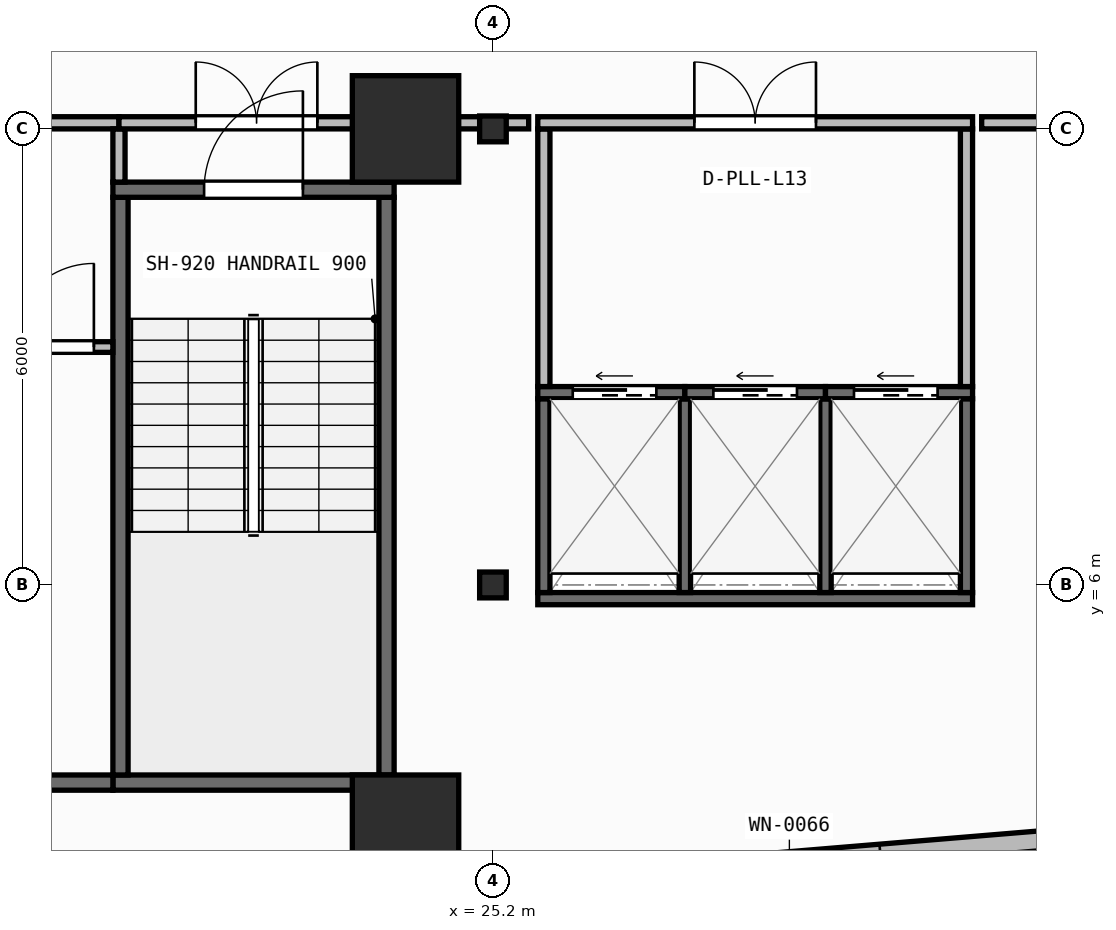
"""IFC4 building model, lengths in metres.
Left out: names, types, materials, properties, quantities, classifications, styles, units other than length and angle.
Written with IfcOpenShell. Run it as: python <this file> out.ifc"""

import sys

from ifc_helpers import new_model, si_unit, direction, frame, frame_2d, origin, origin_2d, place, context, subcontext, project, spatial, rectangle, i_section, extrude, element, fill, save


model = new_model("IFC4")
c1 = context("Model", 3, precision=1e-05, world=origin(), true_north=direction((0.0, 1.0)))
c2 = subcontext(c1, "Body", "Model", "MODEL_VIEW")
j1 = project(units=[si_unit("LENGTHUNIT", "METRE"), si_unit("PLANEANGLEUNIT", "RADIAN")], contexts=[c1])
p1 = place(None, origin())
s1 = spatial("IfcSite", under=j1, at=p1, CompositionType="ELEMENT")
p2 = place(p1, origin())
s2 = spatial("IfcBuilding", under=s1, at=p2, CompositionType="ELEMENT")
p3 = place(p2, frame((0.0, 0.0, 54.1)))
s3 = spatial("IfcBuildingStorey", under=s2, at=p3, CompositionType="ELEMENT", Elevation=54.1)
p4 = place(p3, frame((24.05, 2.8, 0.0), z_axis=(0.0, 0.0, 1.0), x_axis=(1.0, 0.0, 0.0)))
e1 = element("IfcColumn", 1, at=p4, inside=s3, PredefinedType="COLUMN", context=c2, shape_type="SweptSolid", body=[
    extrude(rectangle(XDim=1.4, YDim=1.4, at=origin_2d()), origin(), (0.0, 0.0, 1.0), 3.95),
])
p5 = place(p3, frame((25.2, 6.0, 0.0), z_axis=(0.0, 0.0, 1.0), x_axis=(1.0, 0.0, 0.0)))
e2 = element("IfcColumn", 2, at=p5, inside=s3, PredefinedType="COLUMN", context=c2, shape_type="SweptSolid", body=[
    extrude(i_section(OverallWidth=0.35, OverallDepth=0.34, WebThickness=0.016, FlangeThickness=0.028, at=origin_2d()), origin(), (0.0, 0.0, 1.0), 3.95),
])
p6 = place(p3, frame((24.05, 12.0, 0.0), z_axis=(0.0, 0.0, 1.0), x_axis=(1.0, 0.0, 0.0)))
e3 = element("IfcColumn", 3, at=p6, inside=s3, PredefinedType="COLUMN", context=c2, shape_type="SweptSolid", body=[
    extrude(rectangle(XDim=1.4, YDim=1.4, at=origin_2d()), origin(), (0.0, 0.0, 1.0), 3.95),
])
p7 = place(p3, frame((25.2, 12.0, 0.0), z_axis=(0.0, 0.0, 1.0), x_axis=(1.0, 0.0, 0.0)))
e4 = element("IfcColumn", 4, at=p7, inside=s3, PredefinedType="COLUMN", context=c2, shape_type="SweptSolid", body=[
    extrude(i_section(OverallWidth=0.35, OverallDepth=0.34, WebThickness=0.016, FlangeThickness=0.028, at=origin_2d()), origin(), (0.0, 0.0, 1.0), 3.95),
])
p8 = place(p3, frame((2.76, 0.174, 0.0), z_axis=(0.0, 0.0, 1.0), x_axis=(0.996571478456, 0.082736257641, 0.0)))
e5 = element("IfcWall", 5, at=p8, inside=s3, PredefinedType="STANDARD", context=c2, shape_type="SweptSolid", body=[
    extrude(rectangle(XDim=52.861, YDim=0.26, at=frame_2d((26.431, 0.0))), origin(), (0.0, 0.0, 1.0), 3.71),
])
p9 = place(p8, frame((25.231, 0.0, 0.9)))
e6 = element("IfcOpeningElement", 6, at=p9, cuts=e5, PredefinedType="OPENING", context=c2, shape_type="SweptSolid", body=[
    extrude(rectangle(XDim=2.4, YDim=1.65, at=frame_2d((1.2, 0.825))), frame((0.0, 0.14, 0.0), z_axis=(0.0, -1.0, 0.0), x_axis=(1.0, 0.0, 0.0)), (0.0, 0.0, 1.0), 0.28),
])
p10 = place(p3, frame((20.2, 3.4, 0.0), z_axis=(0.0, 0.0, 1.0), x_axis=(1.0, 0.0, 0.0)))
e7 = element("IfcWall", 7, at=p10, inside=s3, PredefinedType="SHEAR", context=c2, shape_type="SweptSolid", body=[
    extrude(rectangle(XDim=3.7, YDim=0.2, at=frame_2d((1.85, 0.0))), origin(), (0.0, 0.0, 1.0), 3.71),
])
for number, where, z_axis, x_axis in (
    (8, (20.3, 3.5, 0.0), (0.0, 0.0, 1.0), (0.0, 1.0, 0.0)),
    (9, (23.8, 3.5, 0.0), (0.0, 0.0, 1.0), (0.0, 1.0, 0.0)),
):
    element("IfcWall", number, at=place(p3, frame(where, z_axis=z_axis, x_axis=x_axis)), inside=s3, PredefinedType="SHEAR", context=c2, shape_type="SweptSolid", body=[
        extrude(rectangle(XDim=7.6, YDim=0.2, at=frame_2d((3.8, 0.0))), origin(), (0.0, 0.0, 1.0), 3.71),
    ])
p11 = place(p3, frame((20.2, 11.2, 0.0), z_axis=(0.0, 0.0, 1.0), x_axis=(1.0, 0.0, 0.0)))
e10 = element("IfcWall", 10, at=p11, inside=s3, PredefinedType="SHEAR", context=c2, shape_type="SweptSolid", body=[
    extrude(rectangle(XDim=3.7, YDim=0.2, at=frame_2d((1.85, 0.0))), origin(), (0.0, 0.0, 1.0), 3.71),
])
p12 = place(p11, frame((1.2, 0.0, 0.0)))
e11 = element("IfcOpeningElement", 11, at=p12, cuts=e10, PredefinedType="OPENING", context=c2, shape_type="SweptSolid", body=[
    extrude(rectangle(XDim=1.3, YDim=2.15, at=frame_2d((0.65, 1.075))), frame((0.0, 0.11, 0.0), z_axis=(0.0, -1.0, 0.0), x_axis=(1.0, 0.0, 0.0)), (0.0, 0.0, 1.0), 0.22),
])
p13 = place(p3, frame((6.5, 3.4, 0.0), z_axis=(0.0, 0.0, 1.0), x_axis=(1.0, 0.0, 0.0)))
e12 = element("IfcWall", 12, at=p13, inside=s3, PredefinedType="SHEAR", context=c2, shape_type="SweptSolid", body=[
    extrude(rectangle(XDim=13.7, YDim=0.2, at=frame_2d((6.85, 0.0))), origin(), (0.0, 0.0, 1.0), 3.71),
])
p14 = place(p3, frame((25.79, 5.82, 0.0), z_axis=(0.0, 0.0, 1.0), x_axis=(1.0, 0.0, 0.0)))
e13 = element("IfcWall", 13, at=p14, inside=s3, PredefinedType="SHEAR", context=c2, shape_type="SweptSolid", body=[
    extrude(rectangle(XDim=5.72, YDim=0.16, at=frame_2d((2.86, 0.0))), origin(), (0.0, 0.0, 1.0), 3.71),
])
for number, where, z_axis, x_axis in (
    (14, (25.87, 5.9, 0.0), (0.0, 0.0, 1.0), (0.0, 1.0, 0.0)),
    (15, (31.43, 5.9, 0.0), (0.0, 0.0, 1.0), (0.0, 1.0, 0.0)),
):
    element("IfcWall", number, at=place(p3, frame(where, z_axis=z_axis, x_axis=x_axis)), inside=s3, PredefinedType="SHEAR", context=c2, shape_type="SweptSolid", body=[
        extrude(rectangle(XDim=2.55, YDim=0.16, at=frame_2d((1.275, 0.0))), origin(), (0.0, 0.0, 1.0), 3.71),
    ])
for number, where, z_axis, x_axis in (
    (16, (27.725, 5.9, 0.0), (0.0, 0.0, 1.0), (0.0, 1.0, 0.0)),
    (17, (29.575, 5.9, 0.0), (0.0, 0.0, 1.0), (0.0, 1.0, 0.0)),
):
    element("IfcWall", number, at=place(p3, frame(where, z_axis=z_axis, x_axis=x_axis)), inside=s3, PredefinedType="SHEAR", context=c2, shape_type="SweptSolid", body=[
        extrude(rectangle(XDim=2.55, YDim=0.15, at=frame_2d((1.275, 0.0))), origin(), (0.0, 0.0, 1.0), 3.71),
    ])
p15 = place(p3, frame((25.79, 8.53, 0.0), z_axis=(0.0, 0.0, 1.0), x_axis=(1.0, 0.0, 0.0)))
e18 = element("IfcWall", 18, at=p15, inside=s3, PredefinedType="SHEAR", context=c2, shape_type="SweptSolid", body=[
    extrude(rectangle(XDim=1.935, YDim=0.16, at=frame_2d((0.968, 0.0))), origin(), (0.0, 0.0, 1.0), 3.71),
])
p16 = place(p15, frame((0.46, 0.0, 0.0)))
e19 = element("IfcOpeningElement", 19, at=p16, cuts=e18, PredefinedType="OPENING", context=c2, shape_type="SweptSolid", body=[
    extrude(rectangle(XDim=1.1, YDim=2.15, at=frame_2d((0.55, 1.075))), frame((0.0, 0.09, 0.0), z_axis=(0.0, -1.0, 0.0), x_axis=(1.0, 0.0, 0.0)), (0.0, 0.0, 1.0), 0.18),
])
p17 = place(p3, frame((27.725, 8.53, 0.0), z_axis=(0.0, 0.0, 1.0), x_axis=(1.0, 0.0, 0.0)))
e20 = element("IfcWall", 20, at=p17, inside=s3, PredefinedType="SHEAR", context=c2, shape_type="SweptSolid", body=[
    extrude(rectangle(XDim=1.85, YDim=0.16, at=frame_2d((0.925, 0.0))), origin(), (0.0, 0.0, 1.0), 3.71),
])
p18 = place(p17, frame((0.375, 0.0, 0.0)))
e21 = element("IfcOpeningElement", 21, at=p18, cuts=e20, PredefinedType="OPENING", context=c2, shape_type="SweptSolid", body=[
    extrude(rectangle(XDim=1.1, YDim=2.15, at=frame_2d((0.55, 1.075))), frame((0.0, 0.09, 0.0), z_axis=(0.0, -1.0, 0.0), x_axis=(1.0, 0.0, 0.0)), (0.0, 0.0, 1.0), 0.18),
])
p19 = place(p3, frame((29.575, 8.53, 0.0), z_axis=(0.0, 0.0, 1.0), x_axis=(1.0, 0.0, 0.0)))
e22 = element("IfcWall", 22, at=p19, inside=s3, PredefinedType="SHEAR", context=c2, shape_type="SweptSolid", body=[
    extrude(rectangle(XDim=1.935, YDim=0.16, at=frame_2d((0.968, 0.0))), origin(), (0.0, 0.0, 1.0), 3.71),
])
p20 = place(p19, frame((0.375, 0.0, 0.0)))
e23 = element("IfcOpeningElement", 23, at=p20, cuts=e22, PredefinedType="OPENING", context=c2, shape_type="SweptSolid", body=[
    extrude(rectangle(XDim=1.1, YDim=2.15, at=frame_2d((0.55, 1.075))), frame((0.0, 0.09, 0.0), z_axis=(0.0, -1.0, 0.0), x_axis=(1.0, 0.0, 0.0)), (0.0, 0.0, 1.0), 0.18),
])
p21 = place(p3, frame((18.61, 9.13, 0.0), z_axis=(0.0, 0.0, 1.0), x_axis=(1.0, 0.0, 0.0)))
e24 = element("IfcWall", 24, at=p21, inside=s3, PredefinedType="PARTITIONING", context=c2, shape_type="SweptSolid", body=[
    extrude(rectangle(XDim=1.59, YDim=0.14, at=frame_2d((0.795, 0.0))), origin(), (0.0, 0.0, 1.0), 3.71),
])
p22 = place(p21, frame((0.24, 0.0, 0.0)))
e25 = element("IfcOpeningElement", 25, at=p22, cuts=e24, PredefinedType="OPENING", context=c2, shape_type="SweptSolid", body=[
    extrude(rectangle(XDim=1.1, YDim=2.1, at=frame_2d((0.55, 1.05))), frame((0.0, 0.08, 0.0), z_axis=(0.0, -1.0, 0.0), x_axis=(1.0, 0.0, 0.0)), (0.0, 0.0, 1.0), 0.16),
])
p23 = place(p3, frame((12.58, 12.08, 0.0), z_axis=(0.0, 0.0, 1.0), x_axis=(1.0, 0.0, 0.0)))
e26 = element("IfcWall", 26, at=p23, inside=s3, PredefinedType="PARTITIONING", context=c2, shape_type="SweptSolid", body=[
    extrude(rectangle(XDim=7.7, YDim=0.16, at=frame_2d((3.85, 0.0))), origin(), (0.0, 0.0, 1.0), 3.073),
])
p24 = place(p23, frame((3.05, 0.0, 0.0)))
e27 = element("IfcOpeningElement", 27, at=p24, cuts=e26, PredefinedType="OPENING", context=c2, shape_type="SweptSolid", body=[
    extrude(rectangle(XDim=1.6, YDim=2.05, at=frame_2d((0.8, 1.025))), frame((0.0, 0.09, 0.0), z_axis=(0.0, -1.0, 0.0), x_axis=(1.0, 0.0, 0.0)), (0.0, 0.0, 1.0), 0.18),
])
p25 = place(p3, frame((20.28, 11.3, 0.0), z_axis=(0.0, 0.0, 1.0), x_axis=(0.0, 1.0, 0.0)))
e28 = element("IfcWall", 28, at=p25, inside=s3, PredefinedType="PARTITIONING", context=c2, shape_type="SweptSolid", body=[
    extrude(rectangle(XDim=0.7, YDim=0.16, at=frame_2d((0.35, 0.0))), origin(), (0.0, 0.0, 1.0), 3.71),
])
p26 = place(p3, frame((20.28, 12.08, 0.0), z_axis=(0.0, 0.0, 1.0), x_axis=(1.0, 0.0, 0.0)))
e29 = element("IfcWall", 29, at=p26, inside=s3, PredefinedType="PARTITIONING", context=c2, shape_type="SweptSolid", body=[
    extrude(rectangle(XDim=3.62, YDim=0.16, at=frame_2d((1.81, 0.0))), origin(), (0.0, 0.0, 1.0), 3.073),
])
p27 = place(p26, frame((1.01, 0.0, 0.0)))
e30 = element("IfcOpeningElement", 30, at=p27, cuts=e29, PredefinedType="OPENING", context=c2, shape_type="SweptSolid", body=[
    extrude(rectangle(XDim=1.6, YDim=2.05, at=frame_2d((0.8, 1.025))), frame((0.0, 0.09, 0.0), z_axis=(0.0, -1.0, 0.0), x_axis=(1.0, 0.0, 0.0)), (0.0, 0.0, 1.0), 0.18),
])
p28 = place(p3, frame((23.82, 11.3, 0.0), z_axis=(0.0, 0.0, 1.0), x_axis=(0.0, 1.0, 0.0)))
e31 = element("IfcWall", 31, at=p28, inside=s3, PredefinedType="PARTITIONING", context=c2, shape_type="SweptSolid", body=[
    extrude(rectangle(XDim=0.7, YDim=0.16, at=frame_2d((0.35, 0.0))), origin(), (0.0, 0.0, 1.0), 3.71),
])
for number, where, z_axis, x_axis in (
    (32, (25.87, 8.61, 0.0), (0.0, 0.0, 1.0), (0.0, 1.0, 0.0)),
    (33, (31.43, 8.61, 0.0), (0.0, 0.0, 1.0), (0.0, 1.0, 0.0)),
):
    element("IfcWall", number, at=place(p3, frame(where, z_axis=z_axis, x_axis=x_axis)), inside=s3, PredefinedType="PARTITIONING", context=c2, shape_type="SweptSolid", body=[
        extrude(rectangle(XDim=3.39, YDim=0.16, at=frame_2d((1.695, 0.0))), origin(), (0.0, 0.0, 1.0), 3.71),
    ])
p29 = place(p3, frame((25.79, 12.08, 0.0), z_axis=(0.0, 0.0, 1.0), x_axis=(1.0, 0.0, 0.0)))
e34 = element("IfcWall", 34, at=p29, inside=s3, PredefinedType="PARTITIONING", context=c2, shape_type="SweptSolid", body=[
    extrude(rectangle(XDim=5.72, YDim=0.16, at=frame_2d((2.86, 0.0))), origin(), (0.0, 0.0, 1.0), 3.073),
])
p30 = place(p29, frame((2.06, 0.0, 0.0)))
e35 = element("IfcOpeningElement", 35, at=p30, cuts=e34, PredefinedType="OPENING", context=c2, shape_type="SweptSolid", body=[
    extrude(rectangle(XDim=1.6, YDim=2.05, at=frame_2d((0.8, 1.025))), frame((0.0, 0.09, 0.0), z_axis=(0.0, -1.0, 0.0), x_axis=(1.0, 0.0, 0.0)), (0.0, 0.0, 1.0), 0.18),
])
p31 = place(p3, frame((24.02, 12.08, 0.0), z_axis=(0.0, 0.0, 1.0), x_axis=(1.0, 0.0, 0.0)))
e36 = element("IfcWall", 36, at=p31, inside=s3, PredefinedType="PARTITIONING", context=c2, shape_type="SweptSolid", body=[
    extrude(rectangle(XDim=1.65, YDim=0.16, at=frame_2d((0.825, 0.0))), origin(), (0.0, 0.0, 1.0), 3.073),
])
p32 = place(p3, frame((31.63, 12.08, 0.0), z_axis=(0.0, 0.0, 1.0), x_axis=(1.0, 0.0, 0.0)))
e37 = element("IfcWall", 37, at=p32, inside=s3, PredefinedType="PARTITIONING", context=c2, shape_type="SweptSolid", body=[
    extrude(rectangle(XDim=11.181, YDim=0.16, at=frame_2d((5.59, 0.0))), origin(), (0.0, 0.0, 1.0), 3.073),
])
p33 = place(p12, origin())
e38 = element("IfcDoor", 38, at=p33, inside=s3, OperationType="SINGLE_SWING_RIGHT", PredefinedType="DOOR", context=c2, shape_type="SweptSolid", body=[
    extrude(rectangle(XDim=1.3, YDim=2.15, at=frame_2d((0.65, 1.075))), frame((0.0, 0.025, 0.0), z_axis=(0.0, -1.0, 0.0), x_axis=(1.0, 0.0, 0.0)), (0.0, 0.0, 1.0), 0.05),
])
fill(e11, e38)
p34 = place(p16, origin())
e39 = element("IfcDoor", 39, at=p34, inside=s3, OperationType="SLIDING_TO_LEFT", PredefinedType="DOOR", context=c2, shape_type="SweptSolid", body=[
    extrude(rectangle(XDim=1.1, YDim=2.15, at=frame_2d((0.55, 1.075))), frame((0.0, 0.025, 0.0), z_axis=(0.0, -1.0, 0.0), x_axis=(1.0, 0.0, 0.0)), (0.0, 0.0, 1.0), 0.05),
])
fill(e19, e39)
p35 = place(p18, origin())
e40 = element("IfcDoor", 40, at=p35, inside=s3, OperationType="SLIDING_TO_LEFT", PredefinedType="DOOR", context=c2, shape_type="SweptSolid", body=[
    extrude(rectangle(XDim=1.1, YDim=2.15, at=frame_2d((0.55, 1.075))), frame((0.0, 0.025, 0.0), z_axis=(0.0, -1.0, 0.0), x_axis=(1.0, 0.0, 0.0)), (0.0, 0.0, 1.0), 0.05),
])
fill(e21, e40)
p36 = place(p20, origin())
e41 = element("IfcDoor", 41, at=p36, inside=s3, OperationType="SLIDING_TO_LEFT", PredefinedType="DOOR", context=c2, shape_type="SweptSolid", body=[
    extrude(rectangle(XDim=1.1, YDim=2.15, at=frame_2d((0.55, 1.075))), frame((0.0, 0.025, 0.0), z_axis=(0.0, -1.0, 0.0), x_axis=(1.0, 0.0, 0.0)), (0.0, 0.0, 1.0), 0.05),
])
fill(e23, e41)
p37 = place(p22, origin())
e42 = element("IfcDoor", 42, at=p37, inside=s3, OperationType="SINGLE_SWING_RIGHT", PredefinedType="DOOR", context=c2, shape_type="SweptSolid", body=[
    extrude(rectangle(XDim=1.1, YDim=2.1, at=frame_2d((0.55, 1.05))), frame((0.0, 0.025, 0.0), z_axis=(0.0, -1.0, 0.0), x_axis=(1.0, 0.0, 0.0)), (0.0, 0.0, 1.0), 0.05),
])
fill(e25, e42)
p38 = place(p27, origin())
e43 = element("IfcDoor", 43, at=p38, inside=s3, OperationType="DOUBLE_DOOR_SINGLE_SWING", PredefinedType="DOOR", context=c2, shape_type="SweptSolid", body=[
    extrude(rectangle(XDim=1.6, YDim=2.05, at=frame_2d((0.8, 1.025))), frame((0.0, 0.025, 0.0), z_axis=(0.0, -1.0, 0.0), x_axis=(1.0, 0.0, 0.0)), (0.0, 0.0, 1.0), 0.05),
])
fill(e30, e43)
p39 = place(p30, origin())
e44 = element("IfcDoor", 44, at=p39, inside=s3, OperationType="DOUBLE_DOOR_SINGLE_SWING", PredefinedType="DOOR", context=c2, shape_type="SweptSolid", body=[
    extrude(rectangle(XDim=1.6, YDim=2.05, at=frame_2d((0.8, 1.025))), frame((0.0, 0.025, 0.0), z_axis=(0.0, -1.0, 0.0), x_axis=(1.0, 0.0, 0.0)), (0.0, 0.0, 1.0), 0.05),
])
fill(e35, e44)
save(model, sys.argv[1])
